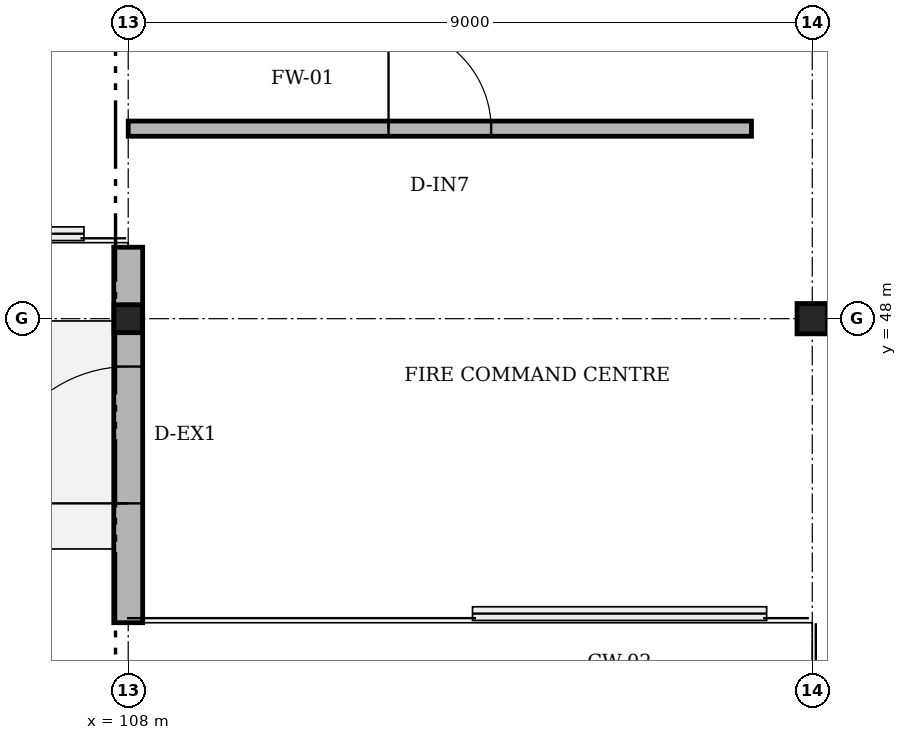
"""IFC4 building model, lengths in metres.
Left out: names, types, materials, properties, quantities, classifications, styles, units other than length and angle.
Written with IfcOpenShell. Run it as: python <this file> out.ifc"""

import sys

from ifc_helpers import new_model, si_unit, direction, frame, frame_2d, origin, origin_2d, place, context, subcontext, project, spatial, rectangle, i_section, extrude, element, fill, save


model = new_model("IFC4")
c1 = context("Model", 3, precision=1e-05, world=origin(), true_north=direction((0.0, 1.0)))
c2 = subcontext(c1, "Body", "Model", "MODEL_VIEW")
j1 = project(units=[si_unit("LENGTHUNIT", "METRE"), si_unit("PLANEANGLEUNIT", "RADIAN")], contexts=[c1])
p1 = place(None, origin())
s1 = spatial("IfcSite", under=j1, at=p1, CompositionType="ELEMENT")
p2 = place(p1, origin())
s2 = spatial("IfcBuilding", under=s1, at=p2, CompositionType="ELEMENT")
p3 = place(p2, origin())
s3 = spatial("IfcBuildingStorey", under=s2, at=p3, CompositionType="ELEMENT", Elevation=0.0)
p4 = place(p3, frame((108.0, 48.0, 0.0), z_axis=(0.0, 0.0, 1.0), x_axis=(1.0, 0.0, 0.0)))
e1 = element("IfcColumn", 1, at=p4, inside=s3, PredefinedType="COLUMN", context=c2, shape_type="SweptSolid", body=[
    extrude(i_section(OverallWidth=0.373, OverallDepth=0.368, WebThickness=0.015, FlangeThickness=0.024, FilletRadius=0.015, at=origin_2d()), origin(), (0.0, 0.0, 1.0), 5.4),
])
p5 = place(p3, frame((117.0, 48.0, 0.0), z_axis=(0.0, 0.0, 1.0), x_axis=(1.0, 0.0, 0.0)))
e2 = element("IfcColumn", 2, at=p5, inside=s3, PredefinedType="COLUMN", context=c2, shape_type="SweptSolid", body=[
    extrude(i_section(OverallWidth=0.401, OverallDepth=0.399, WebThickness=0.025, FlangeThickness=0.04, FilletRadius=0.015, at=origin_2d()), origin(), (0.0, 0.0, 1.0), 5.4),
])
p6 = place(p3, frame((108.0, 44.0, 0.0), z_axis=(0.0, 0.0, 1.0), x_axis=(0.0, 1.0, 0.0)))
e3 = element("IfcWall", 3, at=p6, inside=s3, PredefinedType="SOLIDWALL", context=c2, shape_type="SweptSolid", body=[
    extrude(rectangle(XDim=4.94, YDim=0.38, at=frame_2d((2.47, 0.0))), origin(), (0.0, 0.0, 1.0), 4.224),
])
p7 = place(p6, frame((1.57, 0.0, 0.0)))
e4 = element("IfcOpeningElement", 4, at=p7, cuts=e3, PredefinedType="OPENING", context=c2, shape_type="SweptSolid", body=[
    extrude(rectangle(XDim=1.8, YDim=2.4, at=frame_2d((0.9, 1.2))), frame((0.0, 0.2, 0.0), z_axis=(0.0, -1.0, 0.0), x_axis=(1.0, 0.0, 0.0)), (0.0, 0.0, 1.0), 0.4),
])
p8 = place(p3, frame((108.0, 50.5, 0.0), z_axis=(0.0, 0.0, 1.0), x_axis=(1.0, 0.0, 0.0)))
e5 = element("IfcWall", 5, at=p8, inside=s3, PredefinedType="SOLIDWALL", context=c2, shape_type="SweptSolid", body=[
    extrude(rectangle(XDim=8.2, YDim=0.2, at=frame_2d((4.1, 0.0))), origin(), (0.0, 0.0, 1.0), 3.15),
])
p9 = place(p8, frame((3.425, 0.0, 0.0)))
e6 = element("IfcOpeningElement", 6, at=p9, cuts=e5, PredefinedType="OPENING", context=c2, shape_type="SweptSolid", body=[
    extrude(rectangle(XDim=1.35, YDim=2.2, at=frame_2d((0.675, 1.1))), frame((0.0, 0.11, 0.0), z_axis=(0.0, -1.0, 0.0), x_axis=(1.0, 0.0, 0.0)), (0.0, 0.0, 1.0), 0.22),
])
p10 = place(p7, origin())
e7 = element("IfcDoor", 7, at=p10, inside=s3, OperationType="SINGLE_SWING_LEFT", PredefinedType="DOOR", context=c2, shape_type="SweptSolid", body=[
    extrude(rectangle(XDim=1.8, YDim=2.4, at=frame_2d((0.9, 1.2))), frame((0.0, 0.025, 0.0), z_axis=(0.0, -1.0, 0.0), x_axis=(1.0, 0.0, 0.0)), (0.0, 0.0, 1.0), 0.05),
])
fill(e4, e7)
p11 = place(p9, origin())
e8 = element("IfcDoor", 8, at=p11, inside=s3, OperationType="SINGLE_SWING_LEFT", PredefinedType="DOOR", context=c2, shape_type="SweptSolid", body=[
    extrude(rectangle(XDim=1.35, YDim=2.2, at=frame_2d((0.675, 1.1))), frame((0.0, 0.025, 0.0), z_axis=(0.0, -1.0, 0.0), x_axis=(1.0, 0.0, 0.0)), (0.0, 0.0, 1.0), 0.05),
])
fill(e6, e8)
save(model, sys.argv[1])
